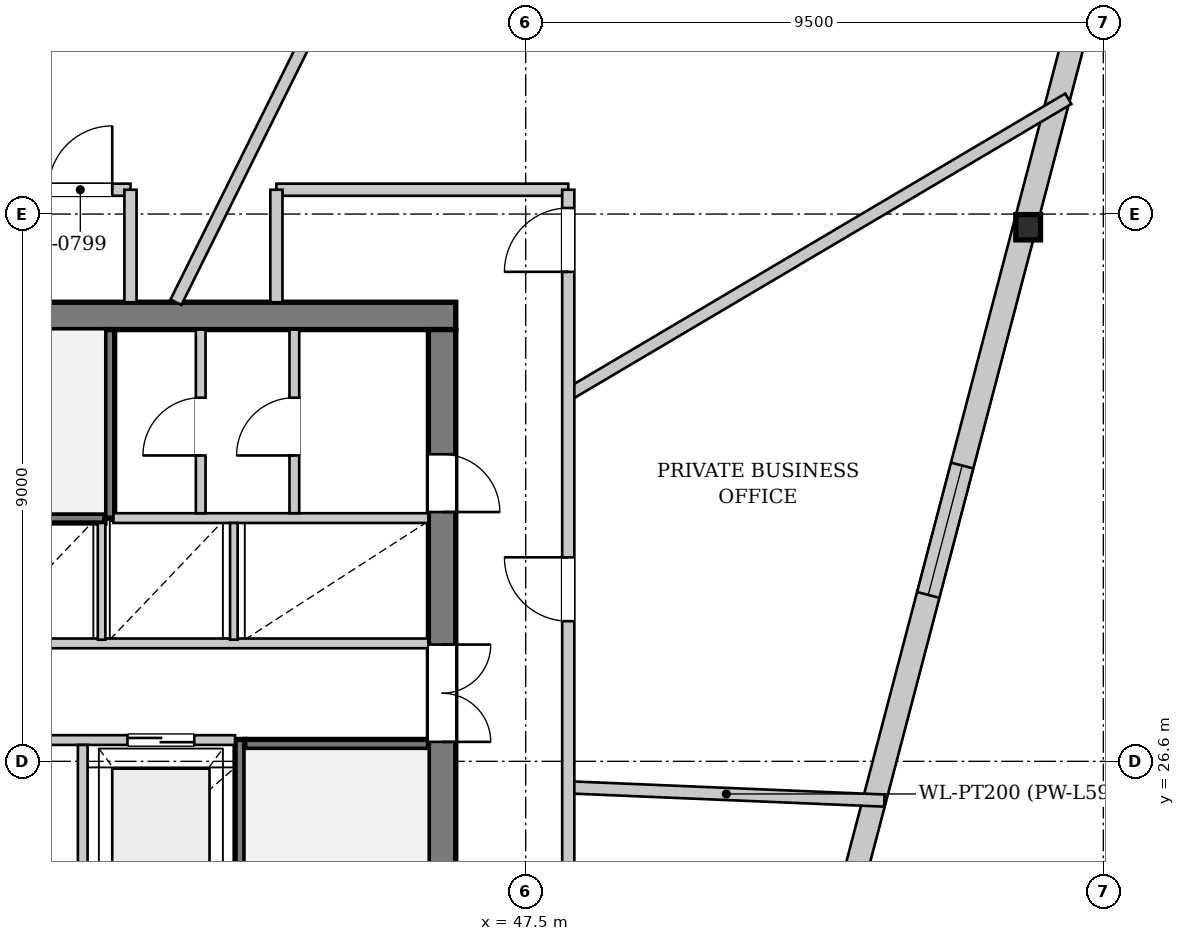
"""IFC4 building model, lengths in metres.
Left out: names, types, materials, properties, quantities, classifications, styles, units other than length and angle.
Written with IfcOpenShell. Run it as: python <this file> out.ifc"""

import sys

from ifc_helpers import new_model, si_unit, direction, frame, frame_2d, origin, origin_2d, place, context, subcontext, project, spatial, rectangle, i_section, extrude, source, transform, mapped, element, fill, save


model = new_model("IFC4")
c1 = context("Model", 3, precision=1e-05, world=origin(), true_north=direction((0.0, 1.0)))
c2 = subcontext(c1, "Body", "Model", "MODEL_VIEW")
j1 = project(units=[si_unit("LENGTHUNIT", "METRE"), si_unit("PLANEANGLEUNIT", "RADIAN")], contexts=[c1])
p1 = place(None, origin())
s1 = spatial("IfcSite", under=j1, at=p1, CompositionType="ELEMENT")
p2 = place(p1, origin())
s2 = spatial("IfcBuilding", under=s1, at=p2, CompositionType="ELEMENT")
p3 = place(p2, frame((0.0, 0.0, 223.8)))
s3 = spatial("IfcBuildingStorey", under=s2, at=p3, CompositionType="ELEMENT", Elevation=223.8)
m1 = source(origin(), c2, "Body", "SweptSolid", [
    extrude(i_section(OverallWidth=0.406, OverallDepth=0.416, WebThickness=0.027, FlangeThickness=0.042, at=origin_2d()), origin(), (0.0, 0.0, 1.0), 3.403),
])
p4 = place(p3, frame((55.865, 35.243, 0.0), z_axis=(-0.059266938757, 0.082370999628, 0.99483790056), x_axis=(-0.811722058131, -0.584043919875, 0.0)))
e1 = element("IfcColumn", 1, at=p4, inside=s3, PredefinedType="COLUMN", context=c2, shape_type="MappedRepresentation", body=[
    mapped(m1, transform((0.0, 0.0, 0.0), x_axis=(1.0, 0.0, 0.0), y_axis=(0.0, 1.0, 0.0), z_axis=(0.0, 0.0, 1.0), scale=1.0)),
])
p5 = place(p3, frame((58.594, 46.407, 0.0), z_axis=(0.0, 0.0, 1.0), x_axis=(-0.253530518145, -0.96732738841, 0.0)))
e2 = element("IfcWall", 2, at=p5, inside=s3, PredefinedType="SOLIDWALL", context=c2, shape_type="SweptSolid", body=[
    extrude(rectangle(XDim=22.982, YDim=0.38, at=frame_2d((11.491, 0.0))), origin(), (0.0, 0.0, 1.0), 2.822),
])
p6 = place(p5, frame((5.335, 0.0, 0.452)))
e3 = element("IfcOpeningElement", 3, at=p6, cuts=e2, PredefinedType="OPENING", context=c2, shape_type="SweptSolid", body=[
    extrude(rectangle(XDim=2.2, YDim=2.25, at=frame_2d((1.1, 1.125))), frame((0.0, 0.2, 0.0), z_axis=(0.0, -1.0, 0.0), x_axis=(1.0, 0.0, 0.0)), (0.0, 0.0, 1.0), 0.4),
])
p7 = place(p5, frame((15.447, 0.0, 0.452)))
e4 = element("IfcOpeningElement", 4, at=p7, cuts=e2, PredefinedType="OPENING", context=c2, shape_type="SweptSolid", body=[
    extrude(rectangle(XDim=2.2, YDim=2.25, at=frame_2d((1.1, 1.125))), frame((0.0, 0.2, 0.0), z_axis=(0.0, -1.0, 0.0), x_axis=(1.0, 0.0, 0.0)), (0.0, 0.0, 1.0), 0.4),
])
p8 = place(p3, frame((29.65, 33.925, 0.0), z_axis=(0.0, 0.0, 1.0), x_axis=(1.0, 0.0, 0.0)))
e5 = element("IfcWall", 5, at=p8, inside=s3, PredefinedType="SHEAR", context=c2, shape_type="SweptSolid", body=[
    extrude(rectangle(XDim=16.7, YDim=0.45, at=frame_2d((8.35, 0.0))), origin(), (0.0, 0.0, 1.0), 3.33),
])
p9 = place(p8, frame((1.45, 0.0, 0.0)))
e6 = element("IfcOpeningElement", 6, at=p9, cuts=e5, PredefinedType="OPENING", context=c2, shape_type="SweptSolid", body=[
    extrude(rectangle(XDim=0.95, YDim=2.1, at=frame_2d((0.475, 1.05))), frame((0.0, 0.235, 0.0), z_axis=(0.0, -1.0, 0.0), x_axis=(1.0, 0.0, 0.0)), (0.0, 0.0, 1.0), 0.47),
])
p10 = place(p8, frame((3.83, 0.0, 0.0)))
e7 = element("IfcOpeningElement", 7, at=p10, cuts=e5, PredefinedType="OPENING", context=c2, shape_type="SweptSolid", body=[
    extrude(rectangle(XDim=1.32, YDim=2.2, at=frame_2d((0.66, 1.1))), frame((0.0, 0.235, 0.0), z_axis=(0.0, -1.0, 0.0), x_axis=(1.0, 0.0, 0.0)), (0.0, 0.0, 1.0), 0.47),
])
p11 = place(p3, frame((46.125, 33.7, 0.0), z_axis=(0.0, 0.0, 1.0), x_axis=(0.0, -1.0, 0.0)))
e8 = element("IfcWall", 8, at=p11, inside=s3, PredefinedType="SHEAR", context=c2, shape_type="SweptSolid", body=[
    extrude(rectangle(XDim=14.2, YDim=0.45, at=frame_2d((7.1, 0.0))), origin(), (0.0, 0.0, 1.0), 3.33),
])
p12 = place(p11, frame((5.18, 0.0, 0.0)))
e9 = element("IfcOpeningElement", 9, at=p12, cuts=e8, PredefinedType="OPENING", context=c2, shape_type="SweptSolid", body=[
    extrude(rectangle(XDim=1.6, YDim=2.2, at=frame_2d((0.8, 1.1))), frame((0.0, 0.235, 0.0), z_axis=(0.0, -1.0, 0.0), x_axis=(1.0, 0.0, 0.0)), (0.0, 0.0, 1.0), 0.47),
])
p13 = place(p11, frame((2.05, 0.0, 0.0)))
e10 = element("IfcOpeningElement", 10, at=p13, cuts=e8, PredefinedType="OPENING", context=c2, shape_type="SweptSolid", body=[
    extrude(rectangle(XDim=0.95, YDim=2.1, at=frame_2d((0.475, 1.05))), frame((0.0, 0.235, 0.0), z_axis=(0.0, -1.0, 0.0), x_axis=(1.0, 0.0, 0.0)), (0.0, 0.0, 1.0), 0.47),
])
p14 = place(p3, frame((42.8, 26.96, 0.0), z_axis=(0.0, 0.0, 1.0), x_axis=(0.0, -1.0, 0.0)))
e11 = element("IfcWall", 11, at=p14, inside=s3, PredefinedType="PARTITIONING", context=c2, shape_type="SweptSolid", body=[
    extrude(rectangle(XDim=7.46, YDim=0.16, at=frame_2d((3.73, 0.0))), origin(), (0.0, 0.0, 1.0), 3.33),
])
p15 = place(p14, frame((6.06, 0.0, 0.0)))
e12 = element("IfcOpeningElement", 12, at=p15, cuts=e11, PredefinedType="OPENING", context=c2, shape_type="SweptSolid", body=[
    extrude(rectangle(XDim=1.32, YDim=2.2, at=frame_2d((0.66, 1.1))), frame((0.0, 0.09, 0.0), z_axis=(0.0, -1.0, 0.0), x_axis=(1.0, 0.0, 0.0)), (0.0, 0.0, 1.0), 0.18),
])
p16 = place(p3, frame((42.88, 26.88, 0.0), z_axis=(0.0, 0.0, 1.0), x_axis=(1.0, 0.0, 0.0)))
e13 = element("IfcWall", 13, at=p16, inside=s3, PredefinedType="PARTITIONING", context=c2, shape_type="SweptSolid", body=[
    extrude(rectangle(XDim=3.02, YDim=0.16, at=frame_2d((1.51, 0.0))), origin(), (0.0, 0.0, 1.0), 3.33),
])
p17 = place(p3, frame((33.28, 30.6, 0.0), z_axis=(0.0, 0.0, 1.0), x_axis=(1.0, 0.0, 0.0)))
e14 = element("IfcWall", 14, at=p17, inside=s3, PredefinedType="PARTITIONING", context=c2, shape_type="SweptSolid", body=[
    extrude(rectangle(XDim=7.3, YDim=0.16, at=frame_2d((3.65, 0.0))), origin(), (0.0, 0.0, 1.0), 3.33),
])
p18 = place(p3, frame((40.66, 30.6, 0.0), z_axis=(0.0, 0.0, 1.0), x_axis=(0.0, 1.0, 0.0)))
e15 = element("IfcWall", 15, at=p18, inside=s3, PredefinedType="PARTITIONING", context=c2, shape_type="SweptSolid", body=[
    extrude(rectangle(XDim=3.1, YDim=0.16, at=frame_2d((1.55, 0.0))), origin(), (0.0, 0.0, 1.0), 3.33),
])
p19 = place(p3, frame((33.28, 26.95, 0.0), z_axis=(0.0, 0.0, 1.0), x_axis=(1.0, 0.0, 0.0)))
e16 = element("IfcWall", 16, at=p19, inside=s3, PredefinedType="PARTITIONING", context=c2, shape_type="SweptSolid", body=[
    extrude(rectangle(XDim=9.44, YDim=0.16, at=frame_2d((4.72, 0.0))), origin(), (0.0, 0.0, 1.0), 3.33),
])
p20 = place(p19, frame((1.2, 0.0, 0.0)))
e17 = element("IfcOpeningElement", 17, at=p20, cuts=e16, PredefinedType="OPENING", context=c2, shape_type="SweptSolid", body=[
    extrude(rectangle(XDim=0.95, YDim=2.1, at=frame_2d((0.475, 1.05))), frame((0.0, 0.09, 0.0), z_axis=(0.0, -1.0, 0.0), x_axis=(1.0, 0.0, 0.0)), (0.0, 0.0, 1.0), 0.18),
])
p21 = place(p19, frame((4.65, 0.0, 0.0)))
e18 = element("IfcOpeningElement", 18, at=p21, cuts=e16, PredefinedType="OPENING", context=c2, shape_type="SweptSolid", body=[
    extrude(rectangle(XDim=0.95, YDim=2.1, at=frame_2d((0.475, 1.05))), frame((0.0, 0.09, 0.0), z_axis=(0.0, -1.0, 0.0), x_axis=(1.0, 0.0, 0.0)), (0.0, 0.0, 1.0), 0.18),
])
p22 = place(p19, frame((7.67, 0.0, 0.0)))
e19 = element("IfcOpeningElement", 19, at=p22, cuts=e16, PredefinedType="OPENING", context=c2, shape_type="SweptSolid", body=[
    extrude(rectangle(XDim=1.1, YDim=2.2, at=frame_2d((0.55, 1.1))), frame((0.0, 0.09, 0.0), z_axis=(0.0, -1.0, 0.0), x_axis=(1.0, 0.0, 0.0)), (0.0, 0.0, 1.0), 0.18),
])
p23 = place(p3, frame((40.215, 24.56, 0.0), z_axis=(0.0, 0.0, 1.0), x_axis=(0.0, 1.0, 0.0)))
e20 = element("IfcWall", 20, at=p23, inside=s3, PredefinedType="PARTITIONING", context=c2, shape_type="SweptSolid", body=[
    extrude(rectangle(XDim=2.31, YDim=0.16, at=frame_2d((1.155, 0.0))), origin(), (0.0, 0.0, 1.0), 3.33),
])
p24 = place(p3, frame((33.28, 28.54, 0.0), z_axis=(0.0, 0.0, 1.0), x_axis=(1.0, 0.0, 0.0)))
e21 = element("IfcWall", 21, at=p24, inside=s3, PredefinedType="PARTITIONING", context=c2, shape_type="SweptSolid", body=[
    extrude(rectangle(XDim=12.62, YDim=0.16, at=frame_2d((6.31, 0.0))), origin(), (0.0, 0.0, 1.0), 3.33),
])
p25 = place(p24, frame((0.26, 0.0, 0.0)))
e22 = element("IfcOpeningElement", 22, at=p25, cuts=e21, PredefinedType="OPENING", context=c2, shape_type="SweptSolid", body=[
    extrude(rectangle(XDim=1.1, YDim=2.2, at=frame_2d((0.55, 1.1))), frame((0.0, 0.09, 0.0), z_axis=(0.0, -1.0, 0.0), x_axis=(1.0, 0.0, 0.0)), (0.0, 0.0, 1.0), 0.18),
])
p26 = place(p24, frame((2.01, 0.0, 0.0)))
e23 = element("IfcOpeningElement", 23, at=p26, cuts=e21, PredefinedType="OPENING", context=c2, shape_type="SweptSolid", body=[
    extrude(rectangle(XDim=1.1, YDim=2.2, at=frame_2d((0.55, 1.1))), frame((0.0, 0.09, 0.0), z_axis=(0.0, -1.0, 0.0), x_axis=(1.0, 0.0, 0.0)), (0.0, 0.0, 1.0), 0.18),
])
p27 = place(p24, frame((3.76, 0.0, 0.0)))
e24 = element("IfcOpeningElement", 24, at=p27, cuts=e21, PredefinedType="OPENING", context=c2, shape_type="SweptSolid", body=[
    extrude(rectangle(XDim=1.1, YDim=2.2, at=frame_2d((0.55, 1.1))), frame((0.0, 0.09, 0.0), z_axis=(0.0, -1.0, 0.0), x_axis=(1.0, 0.0, 0.0)), (0.0, 0.0, 1.0), 0.18),
])
p28 = place(p3, frame((40.72, 30.6, 0.0), z_axis=(0.0, 0.0, 1.0), x_axis=(1.0, 0.0, 0.0)))
e25 = element("IfcWall", 25, at=p28, inside=s3, PredefinedType="PARTITIONING", context=c2, shape_type="SweptSolid", body=[
    extrude(rectangle(XDim=5.18, YDim=0.16, at=frame_2d((2.59, 0.0))), origin(), (0.0, 0.0, 1.0), 3.33),
])
for number, where, z_axis, x_axis in (
    (26, (40.525, 28.6, 0.0), (0.0, 0.0, 1.0), (0.0, 1.0, 0.0)),
    (27, (42.7, 28.6, 0.0), (0.0, 0.0, 1.0), (0.0, 1.0, 0.0)),
):
    element("IfcWall", number, at=place(p3, frame(where, z_axis=z_axis, x_axis=x_axis)), inside=s3, PredefinedType="PARTITIONING", context=c2, shape_type="SweptSolid", body=[
        extrude(rectangle(XDim=1.92, YDim=0.125, at=frame_2d((0.96, 0.0))), origin(), (0.0, 0.0, 1.0), 3.33),
    ])
p29 = place(p3, frame((42.155, 30.68, 0.0), z_axis=(0.0, 0.0, 1.0), x_axis=(0.0, 1.0, 0.0)))
e28 = element("IfcWall", 28, at=p29, inside=s3, PredefinedType="PARTITIONING", context=c2, shape_type="SweptSolid", body=[
    extrude(rectangle(XDim=3.02, YDim=0.16, at=frame_2d((1.51, 0.0))), origin(), (0.0, 0.0, 1.0), 3.33),
])
p30 = place(p29, frame((0.95, 0.0, 0.0)))
e29 = element("IfcOpeningElement", 29, at=p30, cuts=e28, PredefinedType="OPENING", context=c2, shape_type="SweptSolid", body=[
    extrude(rectangle(XDim=0.95, YDim=2.1, at=frame_2d((0.475, 1.05))), frame((0.0, 0.09, 0.0), z_axis=(0.0, -1.0, 0.0), x_axis=(1.0, 0.0, 0.0)), (0.0, 0.0, 1.0), 0.18),
])
p31 = place(p3, frame((43.695, 30.68, 0.0), z_axis=(0.0, 0.0, 1.0), x_axis=(0.0, 1.0, 0.0)))
e30 = element("IfcWall", 30, at=p31, inside=s3, PredefinedType="PARTITIONING", context=c2, shape_type="SweptSolid", body=[
    extrude(rectangle(XDim=3.02, YDim=0.16, at=frame_2d((1.51, 0.0))), origin(), (0.0, 0.0, 1.0), 3.33),
])
p32 = place(p31, frame((0.95, 0.0, 0.0)))
e31 = element("IfcOpeningElement", 31, at=p32, cuts=e30, PredefinedType="OPENING", context=c2, shape_type="SweptSolid", body=[
    extrude(rectangle(XDim=0.95, YDim=2.1, at=frame_2d((0.475, 1.05))), frame((0.0, 0.09, 0.0), z_axis=(0.0, -1.0, 0.0), x_axis=(1.0, 0.0, 0.0)), (0.0, 0.0, 1.0), 0.18),
])
p33 = place(p3, frame((48.2, 26.173, 0.0), z_axis=(0.0, 0.0, 1.0), x_axis=(0.999121979666, -0.041895939512, 0.0)))
e32 = element("IfcWall", 32, at=p33, inside=s3, PredefinedType="PARTITIONING", context=c2, shape_type="SweptSolid", body=[
    extrude(rectangle(XDim=5.204, YDim=0.2, at=frame_2d((2.602, 0.0))), origin(), (0.0, 0.0, 1.0), 3.33),
])
p34 = place(p3, frame((48.2, 32.632, 0.0), z_axis=(0.0, 0.0, 1.0), x_axis=(0.860740290166, 0.509044352571, 0.0)))
e33 = element("IfcWall", 33, at=p34, inside=s3, PredefinedType="PARTITIONING", context=c2, shape_type="SweptSolid", body=[
    extrude(rectangle(XDim=9.555, YDim=0.2, at=frame_2d((4.777, 0.0))), origin(), (0.0, 0.0, 1.0), 3.33),
])
p35 = place(p3, frame((41.748, 34.15, 0.0), z_axis=(0.0, 0.0, 1.0), x_axis=(0.44463448422, 0.895712105222, 0.0)))
e34 = element("IfcWall", 34, at=p35, inside=s3, PredefinedType="PARTITIONING", context=c2, shape_type="SweptSolid", body=[
    extrude(rectangle(XDim=12.618, YDim=0.2, at=frame_2d((6.309, 0.0))), origin(), (0.0, 0.0, 1.0), 3.33),
])
p36 = place(p3, frame((27.8, 36.0, 0.0), z_axis=(0.0, 0.0, 1.0), x_axis=(1.0, 0.0, 0.0)))
e35 = element("IfcWall", 35, at=p36, inside=s3, PredefinedType="PARTITIONING", context=c2, shape_type="SweptSolid", body=[
    extrude(rectangle(XDim=13.2, YDim=0.2, at=frame_2d((6.6, 0.0))), origin(), (0.0, 0.0, 1.0), 3.33),
])
p37 = place(p36, frame((11.85, 0.0, 0.0)))
e36 = element("IfcOpeningElement", 36, at=p37, cuts=e35, PredefinedType="OPENING", context=c2, shape_type="SweptSolid", body=[
    extrude(rectangle(XDim=1.05, YDim=2.2, at=frame_2d((0.525, 1.1))), frame((0.0, 0.11, 0.0), z_axis=(0.0, -1.0, 0.0), x_axis=(1.0, 0.0, 0.0)), (0.0, 0.0, 1.0), 0.22),
])
p38 = place(p36, frame((5.923, 0.0, 0.0)))
e37 = element("IfcOpeningElement", 37, at=p38, cuts=e35, PredefinedType="OPENING", context=c2, shape_type="SweptSolid", body=[
    extrude(rectangle(XDim=1.05, YDim=2.2, at=frame_2d((0.525, 1.1))), frame((0.0, 0.11, 0.0), z_axis=(0.0, -1.0, 0.0), x_axis=(1.0, 0.0, 0.0)), (0.0, 0.0, 1.0), 0.22),
])
p39 = place(p36, frame((0.3, 0.0, 0.0)))
e38 = element("IfcOpeningElement", 38, at=p39, cuts=e35, PredefinedType="OPENING", context=c2, shape_type="SweptSolid", body=[
    extrude(rectangle(XDim=1.05, YDim=2.2, at=frame_2d((0.525, 1.1))), frame((0.0, 0.11, 0.0), z_axis=(0.0, -1.0, 0.0), x_axis=(1.0, 0.0, 0.0)), (0.0, 0.0, 1.0), 0.22),
])
p40 = place(p3, frame((41.0, 34.15, 0.0), z_axis=(0.0, 0.0, 1.0), x_axis=(0.0, 1.0, 0.0)))
e39 = element("IfcWall", 39, at=p40, inside=s3, PredefinedType="PARTITIONING", context=c2, shape_type="SweptSolid", body=[
    extrude(rectangle(XDim=1.85, YDim=0.2, at=frame_2d((0.925, 0.0))), origin(), (0.0, 0.0, 1.0), 3.33),
])
p41 = place(p3, frame((43.4, 36.0, 0.0), z_axis=(0.0, 0.0, 1.0), x_axis=(1.0, 0.0, 0.0)))
e40 = element("IfcWall", 40, at=p41, inside=s3, PredefinedType="PARTITIONING", context=c2, shape_type="SweptSolid", body=[
    extrude(rectangle(XDim=4.8, YDim=0.2, at=frame_2d((2.4, 0.0))), origin(), (0.0, 0.0, 1.0), 3.33),
])
p42 = place(p3, frame((43.4, 34.15, 0.0), z_axis=(0.0, 0.0, 1.0), x_axis=(0.0, 1.0, 0.0)))
e41 = element("IfcWall", 41, at=p42, inside=s3, PredefinedType="PARTITIONING", context=c2, shape_type="SweptSolid", body=[
    extrude(rectangle(XDim=1.85, YDim=0.2, at=frame_2d((0.925, 0.0))), origin(), (0.0, 0.0, 1.0), 3.33),
])
p43 = place(p3, frame((48.2, 17.2, 0.0), z_axis=(0.0, 0.0, 1.0), x_axis=(0.0, 1.0, 0.0)))
e42 = element("IfcWall", 42, at=p43, inside=s3, PredefinedType="PARTITIONING", context=c2, shape_type="SweptSolid", body=[
    extrude(rectangle(XDim=18.8, YDim=0.2, at=frame_2d((9.4, 0.0))), origin(), (0.0, 0.0, 1.0), 3.015),
])
p44 = place(p43, frame((11.705, 0.0, 0.0)))
e43 = element("IfcOpeningElement", 43, at=p44, cuts=e42, PredefinedType="OPENING", context=c2, shape_type="SweptSolid", body=[
    extrude(rectangle(XDim=1.05, YDim=2.2, at=frame_2d((0.525, 1.1))), frame((0.0, 0.11, 0.0), z_axis=(0.0, -1.0, 0.0), x_axis=(1.0, 0.0, 0.0)), (0.0, 0.0, 1.0), 0.22),
])
p45 = place(p43, frame((17.45, 0.0, 0.0)))
e44 = element("IfcOpeningElement", 44, at=p45, cuts=e42, PredefinedType="OPENING", context=c2, shape_type="SweptSolid", body=[
    extrude(rectangle(XDim=1.05, YDim=2.2, at=frame_2d((0.525, 1.1))), frame((0.0, 0.11, 0.0), z_axis=(0.0, -1.0, 0.0), x_axis=(1.0, 0.0, 0.0)), (0.0, 0.0, 1.0), 0.22),
])
p46 = place(p43, frame((0.3, 0.0, 0.0)))
e45 = element("IfcOpeningElement", 45, at=p46, cuts=e42, PredefinedType="OPENING", context=c2, shape_type="SweptSolid", body=[
    extrude(rectangle(XDim=1.05, YDim=2.2, at=frame_2d((0.525, 1.1))), frame((0.0, 0.11, 0.0), z_axis=(0.0, -1.0, 0.0), x_axis=(1.0, 0.0, 0.0)), (0.0, 0.0, 1.0), 0.22),
])
p47 = place(p43, frame((4.377, 0.0, 0.0)))
e46 = element("IfcOpeningElement", 46, at=p47, cuts=e42, PredefinedType="OPENING", context=c2, shape_type="SweptSolid", body=[
    extrude(rectangle(XDim=0.9, YDim=2.1, at=frame_2d((0.45, 1.05))), frame((0.0, 0.11, 0.0), z_axis=(0.0, -1.0, 0.0), x_axis=(1.0, 0.0, 0.0)), (0.0, 0.0, 1.0), 0.22),
])
m2 = source(origin(), c2, "Body", "SweptSolid", [
    extrude(rectangle(XDim=2.2, YDim=2.25, at=frame_2d((1.1, 1.125))), frame((0.0, 0.03, 0.0), z_axis=(0.0, -1.0, 0.0), x_axis=(1.0, 0.0, 0.0)), (0.0, 0.0, 1.0), 0.06),
])
p48 = place(p7, origin())
e47 = element("IfcWindow", 47, at=p48, inside=s3, PartitioningType="SINGLE_PANEL", PredefinedType="WINDOW", context=c2, shape_type="MappedRepresentation", body=[
    mapped(m2, transform((0.0, 0.0, 0.0), x_axis=(1.0, 0.0, 0.0), y_axis=(0.0, 1.0, 0.0), z_axis=(0.0, 0.0, 1.0), scale=1.0)),
])
fill(e4, e47)
m3 = source(origin(), c2, "Body", "SweptSolid", [
    extrude(rectangle(XDim=1.6, YDim=2.2, at=frame_2d((0.8, 1.1))), frame((0.0, 0.025, 0.0), z_axis=(0.0, -1.0, 0.0), x_axis=(1.0, 0.0, 0.0)), (0.0, 0.0, 1.0), 0.05),
])
p49 = place(p12, origin())
e48 = element("IfcDoor", 48, at=p49, inside=s3, OperationType="DOUBLE_DOOR_SINGLE_SWING", PredefinedType="DOOR", context=c2, shape_type="MappedRepresentation", body=[
    mapped(m3, transform((0.0, 0.0, 0.0), x_axis=(1.0, 0.0, 0.0), y_axis=(0.0, 1.0, 0.0), z_axis=(0.0, 0.0, 1.0), scale=1.0)),
])
fill(e9, e48)
m4 = source(origin(), c2, "Body", "SweptSolid", [
    extrude(rectangle(XDim=1.1, YDim=2.2, at=frame_2d((0.55, 1.1))), frame((0.0, 0.025, 0.0), z_axis=(0.0, -1.0, 0.0), x_axis=(1.0, 0.0, 0.0)), (0.0, 0.0, 1.0), 0.05),
])
p50 = place(p22, origin())
e49 = element("IfcDoor", 49, at=p50, inside=s3, OperationType="DOUBLE_DOOR_SLIDING", PredefinedType="DOOR", context=c2, shape_type="MappedRepresentation", body=[
    mapped(m4, transform((0.0, 0.0, 0.0), x_axis=(1.0, 0.0, 0.0), y_axis=(0.0, 1.0, 0.0), z_axis=(0.0, 0.0, 1.0), scale=1.0)),
])
fill(e19, e49)
m5 = source(origin(), c2, "Body", "SweptSolid", [
    extrude(rectangle(XDim=0.95, YDim=2.1, at=frame_2d((0.475, 1.05))), frame((0.0, 0.025, 0.0), z_axis=(0.0, -1.0, 0.0), x_axis=(1.0, 0.0, 0.0)), (0.0, 0.0, 1.0), 0.05),
])
p51 = place(p30, origin())
e50 = element("IfcDoor", 50, at=p51, inside=s3, OperationType="SINGLE_SWING_LEFT", PredefinedType="DOOR", context=c2, shape_type="MappedRepresentation", body=[
    mapped(m5, transform((0.0, 0.0, 0.0), x_axis=(1.0, 0.0, 0.0), y_axis=(0.0, 1.0, 0.0), z_axis=(0.0, 0.0, 1.0), scale=1.0)),
])
fill(e29, e50)
p52 = place(p32, origin())
e51 = element("IfcDoor", 51, at=p52, inside=s3, OperationType="SINGLE_SWING_LEFT", PredefinedType="DOOR", context=c2, shape_type="MappedRepresentation", body=[
    mapped(m5, transform((0.0, 0.0, 0.0), x_axis=(1.0, 0.0, 0.0), y_axis=(0.0, 1.0, 0.0), z_axis=(0.0, 0.0, 1.0), scale=1.0)),
])
fill(e31, e51)
p53 = place(p13, origin())
e52 = element("IfcDoor", 52, at=p53, inside=s3, OperationType="SINGLE_SWING_RIGHT", PredefinedType="DOOR", context=c2, shape_type="MappedRepresentation", body=[
    mapped(m5, transform((0.0, 0.0, 0.0), x_axis=(1.0, 0.0, 0.0), y_axis=(0.0, 1.0, 0.0), z_axis=(0.0, 0.0, 1.0), scale=1.0)),
])
fill(e10, e52)
m6 = source(origin(), c2, "Body", "SweptSolid", [
    extrude(rectangle(XDim=1.05, YDim=2.2, at=frame_2d((0.525, 1.1))), frame((0.0, 0.025, 0.0), z_axis=(0.0, -1.0, 0.0), x_axis=(1.0, 0.0, 0.0)), (0.0, 0.0, 1.0), 0.05),
])
p54 = place(p37, origin())
e53 = element("IfcDoor", 53, at=p54, inside=s3, OperationType="SINGLE_SWING_RIGHT", PredefinedType="DOOR", context=c2, shape_type="MappedRepresentation", body=[
    mapped(m6, transform((0.0, 0.0, 0.0), x_axis=(1.0, 0.0, 0.0), y_axis=(0.0, 1.0, 0.0), z_axis=(0.0, 0.0, 1.0), scale=1.0)),
])
fill(e36, e53)
p55 = place(p44, origin())
e54 = element("IfcDoor", 54, at=p55, inside=s3, OperationType="SINGLE_SWING_RIGHT", PredefinedType="DOOR", context=c2, shape_type="MappedRepresentation", body=[
    mapped(m6, transform((0.0, 0.0, 0.0), x_axis=(1.0, 0.0, 0.0), y_axis=(0.0, 1.0, 0.0), z_axis=(0.0, 0.0, 1.0), scale=1.0)),
])
fill(e43, e54)
p56 = place(p45, origin())
e55 = element("IfcDoor", 55, at=p56, inside=s3, OperationType="SINGLE_SWING_LEFT", PredefinedType="DOOR", context=c2, shape_type="MappedRepresentation", body=[
    mapped(m6, transform((0.0, 0.0, 0.0), x_axis=(1.0, 0.0, 0.0), y_axis=(0.0, 1.0, 0.0), z_axis=(0.0, 0.0, 1.0), scale=1.0)),
])
fill(e44, e55)
save(model, sys.argv[1])
